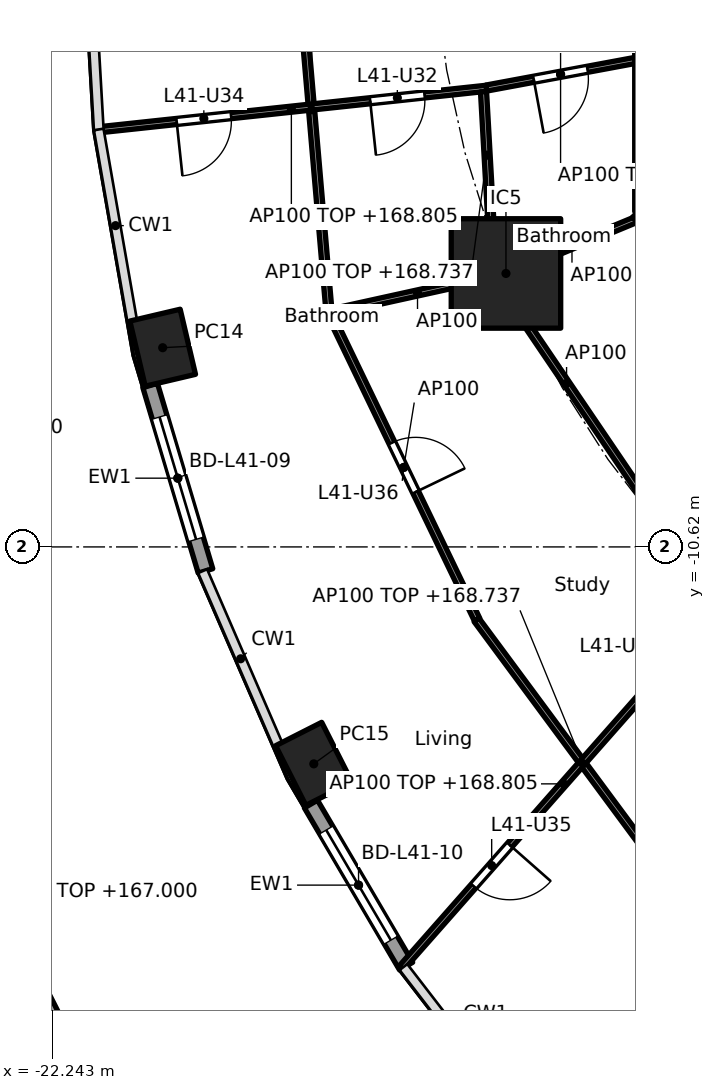
"""IFC4 building model, lengths in metres.
Left out: names, types, materials, properties, quantities, classifications, styles, units other than length and angle.
Written with IfcOpenShell. Run it as: python <this file> out.ifc"""

import sys

from ifc_helpers import new_model, si_unit, direction, frame, frame_2d, origin, origin_2d, place, context, subcontext, project, spatial, rectangle, hollow_rectangle, extrude, element, fill, save


model = new_model("IFC4")
c1 = context("Model", 3, precision=1e-05, world=origin(), true_north=direction((0.0, 1.0)))
c2 = subcontext(c1, "Body", "Model", "MODEL_VIEW")
j1 = project(units=[si_unit("LENGTHUNIT", "METRE"), si_unit("PLANEANGLEUNIT", "RADIAN")], contexts=[c1])
p1 = place(None, origin())
s1 = spatial("IfcSite", under=j1, at=p1, CompositionType="ELEMENT")
p2 = place(p1, origin())
s2 = spatial("IfcBuilding", under=s1, at=p2, CompositionType="ELEMENT")
p3 = place(p2, frame((0.0, 0.0, 165.9)))
s3 = spatial("IfcBuildingStorey", under=s2, at=p3, CompositionType="ELEMENT", Elevation=165.9)
for number, where, z_axis, x_axis in (
    (1, (-20.427, -7.344, -0.26), (0.0, 0.0, 1.0), (0.229, -0.973, 0.0)),
    (2, (-17.942, -14.188, -0.26), (0.0, 0.0, 1.0), (0.452, -0.892, 0.0)),
):
    element("IfcColumn", number, at=place(p3, frame(where, z_axis=z_axis, x_axis=x_axis)), inside=s3, PredefinedType="COLUMN", context=c2, shape_type="SweptSolid", body=[
        extrude(hollow_rectangle(XDim=1.1, YDim=0.85, WallThickness=0.036, at=origin_2d()), origin(), (0.0, 0.0, 1.0), 3.96),
    ])
p4 = place(p3, frame((-14.782, -6.123, 0.0), z_axis=(0.0, 0.0, 1.0), x_axis=(1.0, 0.0, 0.0)))
e3 = element("IfcColumn", 3, at=p4, inside=s3, PredefinedType="COLUMN", context=c2, shape_type="SweptSolid", body=[
    extrude(rectangle(XDim=1.8, YDim=1.8, at=origin_2d()), origin(), (0.0, 0.0, 1.0), 3.7),
])
p5 = place(p3, frame((-19.724, -11.014, 0.0), z_axis=(0.0, 0.0, 1.0), x_axis=(-0.28584838049, 0.958274857946, 0.0)))
e4 = element("IfcWall", 4, at=p5, inside=s3, PredefinedType="SOLIDWALL", context=c2, shape_type="SweptSolid", body=[
    extrude(rectangle(XDim=3.182, YDim=0.25, at=frame_2d((1.591, 0.0))), origin(), (0.0, 0.0, 1.0), 3.44),
])
p6 = place(p5, frame((0.541, 0.0, 0.0)))
e5 = element("IfcOpeningElement", 5, at=p6, cuts=e4, PredefinedType="OPENING", context=c2, shape_type="SweptSolid", body=[
    extrude(rectangle(XDim=2.1, YDim=2.4, at=frame_2d((1.05, 1.2))), frame((0.0, 0.135, 0.0), z_axis=(0.0, -1.0, 0.0), x_axis=(1.0, 0.0, 0.0)), (0.0, 0.0, 1.0), 0.27),
])
p7 = place(p3, frame((-16.424, -17.515, 0.0), z_axis=(0.0, 0.0, 1.0), x_axis=(-0.506309086483, 0.862352079458, 0.0)))
e6 = element("IfcWall", 6, at=p7, inside=s3, PredefinedType="SOLIDWALL", context=c2, shape_type="SweptSolid", body=[
    extrude(rectangle(XDim=3.092, YDim=0.25, at=frame_2d((1.546, 0.0))), origin(), (0.0, 0.0, 1.0), 3.44),
])
p8 = place(p7, frame((0.496, 0.0, 0.0)))
e7 = element("IfcOpeningElement", 7, at=p8, cuts=e6, PredefinedType="OPENING", context=c2, shape_type="SweptSolid", body=[
    extrude(rectangle(XDim=2.1, YDim=2.4, at=frame_2d((1.05, 1.2))), frame((0.0, 0.135, 0.0), z_axis=(0.0, -1.0, 0.0), x_axis=(1.0, 0.0, 0.0)), (0.0, 0.0, 1.0), 0.27),
])
p9 = place(p3, frame((-21.839, -20.639, 0.0), z_axis=(0.0, 0.0, 1.0), x_axis=(-0.452400486723, 0.89181489089, 0.0)))
e8 = element("IfcWall", 8, at=p9, inside=s3, PredefinedType="SOLIDWALL", context=c2, shape_type="SweptSolid", body=[
    extrude(rectangle(XDim=7.05, YDim=1.6, at=frame_2d((3.525, 0.0))), origin(), (0.0, 0.0, 1.0), 1.1),
])
p10 = place(p3, frame((-12.565, 5.304, 0.0), z_axis=(0.0, 0.0, 1.0), x_axis=(0.0, -1.0, 0.0)))
e9 = element("IfcWall", 9, at=p10, inside=s3, PredefinedType="PARTITIONING", context=c2, shape_type="SweptSolid", body=[
    extrude(rectangle(XDim=10.409, YDim=0.2, at=frame_2d((5.205, 0.0))), origin(), (0.0, 0.0, 1.0), 3.44),
])
p11 = place(p10, frame((6.106, 0.0, 0.0)))
e10 = element("IfcOpeningElement", 10, at=p11, cuts=e9, PredefinedType="OPENING", context=c2, shape_type="SweptSolid", body=[
    extrude(rectangle(XDim=1.0, YDim=2.1, at=frame_2d((0.5, 1.05))), frame((0.0, 0.11, 0.0), z_axis=(0.0, -1.0, 0.0), x_axis=(1.0, 0.0, 0.0)), (0.0, 0.0, 1.0), 0.22),
])
p12 = place(p3, frame((-12.635, -5.134, 0.0), z_axis=(0.0, 0.0, 1.0), x_axis=(0.707106781187, -0.707106781187, 0.0)))
e11 = element("IfcWall", 11, at=p12, inside=s3, PredefinedType="PARTITIONING", context=c2, shape_type="SweptSolid", body=[
    extrude(rectangle(XDim=10.609, YDim=0.2, at=frame_2d((5.305, 0.0))), origin(), (0.0, 0.0, 1.0), 3.44),
])
p13 = place(p3, frame((-18.271, -0.05, 0.0), z_axis=(0.0, 0.0, 1.0), x_axis=(0.086018199227, -0.996293565874, 0.0)))
e12 = element("IfcWall", 12, at=p13, inside=s3, PredefinedType="PARTITIONING", context=c2, shape_type="SweptSolid", body=[
    extrude(rectangle(XDim=6.789, YDim=0.1, at=frame_2d((3.395, 0.0))), origin(), (0.0, 0.0, 1.0), 2.837),
])
p14 = place(p3, frame((-12.663, -2.621, 0.0), z_axis=(0.0, 0.0, 1.0), x_axis=(-0.983176884312, -0.182655999505, 0.0)))
e13 = element("IfcWall", 13, at=p14, inside=s3, PredefinedType="PARTITIONING", context=c2, shape_type="SweptSolid", body=[
    extrude(rectangle(XDim=2.483, YDim=0.1, at=frame_2d((1.242, 0.0))), origin(), (0.0, 0.0, 1.0), 2.756),
])
p15 = place(p14, frame((0.792, 0.0, 0.0)))
e14 = element("IfcOpeningElement", 14, at=p15, cuts=e13, PredefinedType="OPENING", context=c2, shape_type="SweptSolid", body=[
    extrude(rectangle(XDim=0.9, YDim=2.1, at=frame_2d((0.45, 1.05))), frame((0.0, 0.06, 0.0), z_axis=(0.0, -1.0, 0.0), x_axis=(1.0, 0.0, 0.0)), (0.0, 0.0, 1.0), 0.12),
])
p16 = place(p3, frame((-15.104, -3.078, 0.0), z_axis=(0.0, 0.0, 1.0), x_axis=(-0.994316167803, -0.106467640365, 0.0)))
e15 = element("IfcWall", 15, at=p16, inside=s3, PredefinedType="PARTITIONING", context=c2, shape_type="SweptSolid", body=[
    extrude(rectangle(XDim=6.45, YDim=0.1, at=frame_2d((3.225, 0.0))), origin(), (0.0, 0.0, 1.0), 2.905),
])
p17 = place(p16, frame((1.022, 0.0, 0.0)))
e16 = element("IfcOpeningElement", 16, at=p17, cuts=e15, PredefinedType="OPENING", context=c2, shape_type="SweptSolid", body=[
    extrude(rectangle(XDim=0.9, YDim=2.1, at=frame_2d((0.45, 1.05))), frame((0.0, 0.06, 0.0), z_axis=(0.0, -1.0, 0.0), x_axis=(1.0, 0.0, 0.0)), (0.0, 0.0, 1.0), 0.12),
])
p18 = place(p16, frame((4.223, 0.0, 0.0)))
e17 = element("IfcOpeningElement", 17, at=p18, cuts=e15, PredefinedType="OPENING", context=c2, shape_type="SweptSolid", body=[
    extrude(rectangle(XDim=0.9, YDim=2.1, at=frame_2d((0.45, 1.05))), frame((0.0, 0.06, 0.0), z_axis=(0.0, -1.0, 0.0), x_axis=(1.0, 0.0, 0.0)), (0.0, 0.0, 1.0), 0.12),
])
p19 = place(p3, frame((-15.151, -3.133, 0.0), z_axis=(0.0, 0.0, 1.0), x_axis=(0.05637501378, -0.998409664327, 0.0)))
e18 = element("IfcWall", 18, at=p19, inside=s3, PredefinedType="PARTITIONING", context=c2, shape_type="SweptSolid", body=[
    extrude(rectangle(XDim=2.988, YDim=0.1, at=frame_2d((1.494, 0.0))), origin(), (0.0, 0.0, 1.0), 2.837),
])
p20 = place(p3, frame((-12.657, -5.243, 0.0), z_axis=(0.0, 0.0, 1.0), x_axis=(-0.923848837015, -0.382757529444, 0.0)))
e19 = element("IfcWall", 19, at=p20, inside=s3, PredefinedType="PARTITIONING", context=c2, shape_type="SweptSolid", body=[
    extrude(rectangle(XDim=2.25, YDim=0.1, at=frame_2d((1.125, 0.0))), origin(), (0.0, 0.0, 1.0), 3.44),
])
p21 = place(p3, frame((-14.831, -6.134, 0.0), z_axis=(0.0, 0.0, 1.0), x_axis=(-0.976560749847, -0.215241961191, 0.0)))
e20 = element("IfcWall", 20, at=p21, inside=s3, PredefinedType="PARTITIONING", context=c2, shape_type="SweptSolid", body=[
    extrude(rectangle(XDim=2.879, YDim=0.1, at=frame_2d((1.439, 0.0))), origin(), (0.0, 0.0, 1.0), 3.44),
])
p22 = place(p3, frame((-14.952, -6.208, 0.0), z_axis=(0.0, 0.0, 1.0), x_axis=(0.561064907171, -0.827771810308, 0.0)))
e21 = element("IfcWall", 21, at=p22, inside=s3, PredefinedType="PARTITIONING", context=c2, shape_type="SweptSolid", body=[
    extrude(rectangle(XDim=4.159, YDim=0.1, at=frame_2d((2.079, 0.0))), origin(), (0.0, 0.0, 1.0), 3.44),
])
p23 = place(p3, frame((-17.669, -6.809, 0.0), z_axis=(0.0, 0.0, 1.0), x_axis=(0.434040130629, -0.900893536997, 0.0)))
e22 = element("IfcWall", 22, at=p23, inside=s3, PredefinedType="PARTITIONING", context=c2, shape_type="SweptSolid", body=[
    extrude(rectangle(XDim=5.558, YDim=0.1, at=frame_2d((2.779, 0.0))), origin(), (0.0, 0.0, 1.0), 3.44),
])
p24 = place(p23, frame((2.329, 0.0, 0.0)))
e23 = element("IfcOpeningElement", 23, at=p24, cuts=e22, PredefinedType="OPENING", context=c2, shape_type="SweptSolid", body=[
    extrude(rectangle(XDim=0.9, YDim=2.1, at=frame_2d((0.45, 1.05))), frame((0.0, 0.06, 0.0), z_axis=(0.0, -1.0, 0.0), x_axis=(1.0, 0.0, 0.0)), (0.0, 0.0, 1.0), 0.12),
])
p25 = place(p3, frame((-12.623, -9.653, 0.0), z_axis=(0.0, 0.0, 1.0), x_axis=(0.640297481347, -0.768127030758, 0.0)))
e24 = element("IfcWall", 24, at=p25, inside=s3, PredefinedType="PARTITIONING", context=c2, shape_type="SweptSolid", body=[
    extrude(rectangle(XDim=4.672, YDim=0.1, at=frame_2d((2.336, 0.0))), origin(), (0.0, 0.0, 1.0), 2.837),
])
p26 = place(p25, frame((3.029, 0.0, 0.0)))
e25 = element("IfcOpeningElement", 25, at=p26, cuts=e24, PredefinedType="OPENING", context=c2, shape_type="SweptSolid", body=[
    extrude(rectangle(XDim=0.9, YDim=2.1, at=frame_2d((0.45, 1.05))), frame((0.0, 0.06, 0.0), z_axis=(0.0, -1.0, 0.0), x_axis=(1.0, 0.0, 0.0)), (0.0, 0.0, 1.0), 0.12),
])
p27 = place(p3, frame((-15.265, -11.821, 0.0), z_axis=(0.0, 0.0, 1.0), x_axis=(0.594711348772, -0.803939308432, 0.0)))
e26 = element("IfcWall", 26, at=p27, inside=s3, PredefinedType="PARTITIONING", context=c2, shape_type="SweptSolid", body=[
    extrude(rectangle(XDim=5.872, YDim=0.1, at=frame_2d((2.936, 0.0))), origin(), (0.0, 0.0, 1.0), 2.837),
])
p28 = place(p3, frame((-11.16, -11.485, 0.0), z_axis=(0.0, 0.0, 1.0), x_axis=(-0.661275898802, -0.750142776852, 0.0)))
e27 = element("IfcWall", 27, at=p28, inside=s3, PredefinedType="PARTITIONING", context=c2, shape_type="SweptSolid", body=[
    extrude(rectangle(XDim=8.083, YDim=0.1, at=frame_2d((4.041, 0.0))), origin(), (0.0, 0.0, 1.0), 2.905),
])
p29 = place(p28, frame((5.382, 0.0, 0.0)))
e28 = element("IfcOpeningElement", 28, at=p29, cuts=e27, PredefinedType="OPENING", context=c2, shape_type="SweptSolid", body=[
    extrude(rectangle(XDim=0.9, YDim=2.1, at=frame_2d((0.45, 1.05))), frame((0.0, 0.06, 0.0), z_axis=(0.0, -1.0, 0.0), x_axis=(1.0, 0.0, 0.0)), (0.0, 0.0, 1.0), 0.12),
])
p30 = place(p28, frame((1.341, 0.0, 0.0)))
e29 = element("IfcOpeningElement", 29, at=p30, cuts=e27, PredefinedType="OPENING", context=c2, shape_type="SweptSolid", body=[
    extrude(rectangle(XDim=0.9, YDim=2.1, at=frame_2d((0.45, 1.05))), frame((0.0, 0.06, 0.0), z_axis=(0.0, -1.0, 0.0), x_axis=(1.0, 0.0, 0.0)), (0.0, 0.0, 1.0), 0.12),
])
p31 = place(p6, origin())
e30 = element("IfcDoor", 30, at=p31, inside=s3, OperationType="SLIDING_TO_LEFT", PredefinedType="DOOR", context=c2, shape_type="SweptSolid", body=[
    extrude(rectangle(XDim=2.1, YDim=2.4, at=frame_2d((1.05, 1.2))), frame((0.0, 0.025, 0.0), z_axis=(0.0, -1.0, 0.0), x_axis=(1.0, 0.0, 0.0)), (0.0, 0.0, 1.0), 0.05),
])
fill(e5, e30)
p32 = place(p8, origin())
e31 = element("IfcDoor", 31, at=p32, inside=s3, OperationType="SLIDING_TO_LEFT", PredefinedType="DOOR", context=c2, shape_type="SweptSolid", body=[
    extrude(rectangle(XDim=2.1, YDim=2.4, at=frame_2d((1.05, 1.2))), frame((0.0, 0.025, 0.0), z_axis=(0.0, -1.0, 0.0), x_axis=(1.0, 0.0, 0.0)), (0.0, 0.0, 1.0), 0.05),
])
fill(e7, e31)
p33 = place(p15, origin())
e32 = element("IfcDoor", 32, at=p33, inside=s3, OperationType="SINGLE_SWING_RIGHT", PredefinedType="DOOR", context=c2, shape_type="SweptSolid", body=[
    extrude(rectangle(XDim=0.9, YDim=2.1, at=frame_2d((0.45, 1.05))), frame((0.0, 0.025, 0.0), z_axis=(0.0, -1.0, 0.0), x_axis=(1.0, 0.0, 0.0)), (0.0, 0.0, 1.0), 0.05),
])
fill(e14, e32)
p34 = place(p17, origin())
e33 = element("IfcDoor", 33, at=p34, inside=s3, OperationType="SINGLE_SWING_RIGHT", PredefinedType="DOOR", context=c2, shape_type="SweptSolid", body=[
    extrude(rectangle(XDim=0.9, YDim=2.1, at=frame_2d((0.45, 1.05))), frame((0.0, 0.025, 0.0), z_axis=(0.0, -1.0, 0.0), x_axis=(1.0, 0.0, 0.0)), (0.0, 0.0, 1.0), 0.05),
])
fill(e16, e33)
p35 = place(p18, origin())
e34 = element("IfcDoor", 34, at=p35, inside=s3, OperationType="SINGLE_SWING_RIGHT", PredefinedType="DOOR", context=c2, shape_type="SweptSolid", body=[
    extrude(rectangle(XDim=0.9, YDim=2.1, at=frame_2d((0.45, 1.05))), frame((0.0, 0.025, 0.0), z_axis=(0.0, -1.0, 0.0), x_axis=(1.0, 0.0, 0.0)), (0.0, 0.0, 1.0), 0.05),
])
fill(e17, e34)
p36 = place(p29, origin())
e35 = element("IfcDoor", 35, at=p36, inside=s3, OperationType="SINGLE_SWING_LEFT", PredefinedType="DOOR", context=c2, shape_type="SweptSolid", body=[
    extrude(rectangle(XDim=0.9, YDim=2.1, at=frame_2d((0.45, 1.05))), frame((0.0, 0.025, 0.0), z_axis=(0.0, -1.0, 0.0), x_axis=(1.0, 0.0, 0.0)), (0.0, 0.0, 1.0), 0.05),
])
fill(e28, e35)
p37 = place(p24, origin())
e36 = element("IfcDoor", 36, at=p37, inside=s3, OperationType="SINGLE_SWING_RIGHT", PredefinedType="DOOR", context=c2, shape_type="SweptSolid", body=[
    extrude(rectangle(XDim=0.9, YDim=2.1, at=frame_2d((0.45, 1.05))), frame((0.0, 0.025, 0.0), z_axis=(0.0, -1.0, 0.0), x_axis=(1.0, 0.0, 0.0)), (0.0, 0.0, 1.0), 0.05),
])
fill(e23, e36)
p38 = place(p30, origin())
e37 = element("IfcDoor", 37, at=p38, inside=s3, OperationType="SINGLE_SWING_LEFT", PredefinedType="DOOR", context=c2, shape_type="SweptSolid", body=[
    extrude(rectangle(XDim=0.9, YDim=2.1, at=frame_2d((0.45, 1.05))), frame((0.0, 0.025, 0.0), z_axis=(0.0, -1.0, 0.0), x_axis=(1.0, 0.0, 0.0)), (0.0, 0.0, 1.0), 0.05),
])
fill(e29, e37)
save(model, sys.argv[1])
